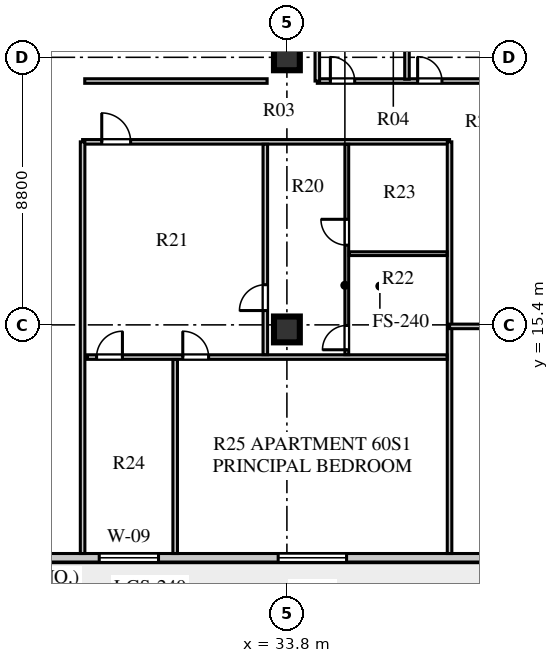
"""IFC4 building model, lengths in metres.
Left out: names, types, materials, properties, quantities, classifications, styles, units other than length and angle.
Written with IfcOpenShell. Run it as: python <this file> out.ifc"""

import sys

from ifc_helpers import new_model, si_unit, direction, frame, frame_2d, origin, origin_2d, place, context, subcontext, project, spatial, rectangle, extrude, element, fill, save


model = new_model("IFC4")
c1 = context("Model", 3, precision=1e-05, world=origin(), true_north=direction((0.0, 1.0)))
c2 = subcontext(c1, "Body", "Model", "MODEL_VIEW")
j1 = project(units=[si_unit("LENGTHUNIT", "METRE"), si_unit("PLANEANGLEUNIT", "RADIAN")], contexts=[c1])
p1 = place(None, origin())
s1 = spatial("IfcSite", under=j1, at=p1, CompositionType="ELEMENT")
p2 = place(p1, origin())
s2 = spatial("IfcBuilding", under=s1, at=p2, CompositionType="ELEMENT")
p3 = place(p2, frame((0.0, 0.0, 245.3)))
s3 = spatial("IfcBuildingStorey", under=s2, at=p3, CompositionType="ELEMENT", Elevation=245.3)
for number, where, z_axis, x_axis in (
    (1, (33.8, 15.25, 0.0), (0.0, 0.0, 1.0), (1.0, 0.0, 0.0)),
    (2, (33.8, 24.2, 0.0), (0.0, 0.0, 1.0), (1.0, 0.0, 0.0)),
):
    element("IfcColumn", number, at=place(p3, frame(where, z_axis=z_axis, x_axis=x_axis)), inside=s3, PredefinedType="COLUMN", context=c2, shape_type="SweptSolid", body=[
        extrude(rectangle(XDim=0.85, YDim=0.85, at=origin_2d()), origin(), (0.0, 0.0, 1.0), 3.66),
    ])
p4 = place(p3, frame((13.05, 7.74, 0.0), z_axis=(0.0, 0.0, 1.0), x_axis=(1.0, 0.0, 0.0)))
e3 = element("IfcWall", 3, at=p4, inside=s3, PredefinedType="STANDARD", context=c2, shape_type="SweptSolid", body=[
    extrude(rectangle(XDim=32.5, YDim=0.28, at=frame_2d((16.25, 0.0))), origin(), (0.0, 0.0, 1.0), 3.66),
])
p5 = place(p4, frame((0.95, 0.0, 0.0)))
e4 = element("IfcOpeningElement", 4, at=p5, cuts=e3, PredefinedType="OPENING", context=c2, shape_type="SweptSolid", body=[
    extrude(rectangle(XDim=1.0, YDim=2.05, at=frame_2d((0.5, 1.025))), frame((0.0, 0.15, 0.0), z_axis=(0.0, -1.0, 0.0), x_axis=(1.0, 0.0, 0.0)), (0.0, 0.0, 1.0), 0.3),
])
p6 = place(p4, frame((6.21, 0.0, 0.8)))
e5 = element("IfcOpeningElement", 5, at=p6, cuts=e3, PredefinedType="OPENING", context=c2, shape_type="SweptSolid", body=[
    extrude(rectangle(XDim=1.65, YDim=1.95, at=frame_2d((0.825, 0.975))), frame((0.0, 0.15, 0.0), z_axis=(0.0, -1.0, 0.0), x_axis=(1.0, 0.0, 0.0)), (0.0, 0.0, 1.0), 0.3),
])
p7 = place(p4, frame((14.577, 0.0, 0.8)))
e6 = element("IfcOpeningElement", 6, at=p7, cuts=e3, PredefinedType="OPENING", context=c2, shape_type="SweptSolid", body=[
    extrude(rectangle(XDim=1.95, YDim=2.0, at=frame_2d((0.975, 1.0))), frame((0.0, 0.15, 0.0), z_axis=(0.0, -1.0, 0.0), x_axis=(1.0, 0.0, 0.0)), (0.0, 0.0, 1.0), 0.3),
])
p8 = place(p4, frame((20.463, 0.0, 0.8)))
e7 = element("IfcOpeningElement", 7, at=p8, cuts=e3, PredefinedType="OPENING", context=c2, shape_type="SweptSolid", body=[
    extrude(rectangle(XDim=2.25, YDim=2.0, at=frame_2d((1.125, 1.0))), frame((0.0, 0.15, 0.0), z_axis=(0.0, -1.0, 0.0), x_axis=(1.0, 0.0, 0.0)), (0.0, 0.0, 1.0), 0.3),
])
p9 = place(p4, frame((28.345, 0.0, 0.8)))
e8 = element("IfcOpeningElement", 8, at=p9, cuts=e3, PredefinedType="OPENING", context=c2, shape_type="SweptSolid", body=[
    extrude(rectangle(XDim=1.8, YDim=2.0, at=frame_2d((0.9, 1.0))), frame((0.0, 0.15, 0.0), z_axis=(0.0, -1.0, 0.0), x_axis=(1.0, 0.0, 0.0)), (0.0, 0.0, 1.0), 0.3),
])
p10 = place(p3, frame((27.08, 21.42, 0.0), z_axis=(0.0, 0.0, 1.0), x_axis=(1.0, 0.0, 0.0)))
e9 = element("IfcWall", 9, at=p10, inside=s3, PredefinedType="PARTITIONING", context=c2, shape_type="SweptSolid", body=[
    extrude(rectangle(XDim=12.07, YDim=0.15, at=frame_2d((6.035, 0.0))), origin(), (0.0, 0.0, 1.0), 3.31),
])
p11 = place(p10, frame((0.63, 0.0, 0.0)))
e10 = element("IfcOpeningElement", 10, at=p11, cuts=e9, PredefinedType="OPENING", context=c2, shape_type="SweptSolid", body=[
    extrude(rectangle(XDim=0.95, YDim=2.1, at=frame_2d((0.475, 1.05))), frame((0.0, 0.085, 0.0), z_axis=(0.0, -1.0, 0.0), x_axis=(1.0, 0.0, 0.0)), (0.0, 0.0, 1.0), 0.17),
])
p12 = place(p3, frame((27.08, 7.88, 0.0), z_axis=(0.0, 0.0, 1.0), x_axis=(0.0, 1.0, 0.0)))
e11 = element("IfcWall", 11, at=p12, inside=s3, PredefinedType="PARTITIONING", context=c2, shape_type="SweptSolid", body=[
    extrude(rectangle(XDim=13.54, YDim=0.15, at=frame_2d((6.77, 0.0))), origin(), (0.0, 0.0, 1.0), 3.66),
])
p13 = place(p3, frame((27.15, 23.42, 0.0), z_axis=(0.0, 0.0, 1.0), x_axis=(1.0, 0.0, 0.0)))
e12 = element("IfcWall", 12, at=p13, inside=s3, PredefinedType="PARTITIONING", context=c2, shape_type="SweptSolid", body=[
    extrude(rectangle(XDim=6.0, YDim=0.15, at=frame_2d((3.0, 0.0))), origin(), (0.0, 0.0, 1.0), 3.66),
])
p14 = place(p3, frame((39.15, 7.88, 0.0), z_axis=(0.0, 0.0, 1.0), x_axis=(0.0, 1.0, 0.0)))
e13 = element("IfcWall", 13, at=p14, inside=s3, PredefinedType="PARTITIONING", context=c2, shape_type="SweptSolid", body=[
    extrude(rectangle(XDim=13.54, YDim=0.15, at=frame_2d((6.77, 0.0))), origin(), (0.0, 0.0, 1.0), 3.66),
])
p15 = place(p3, frame((27.24, 14.341, 0.0), z_axis=(0.0, 0.0, 1.0), x_axis=(1.0, 0.0, 0.0)))
e14 = element("IfcWall", 14, at=p15, inside=s3, PredefinedType="PARTITIONING", context=c2, shape_type="SweptSolid", body=[
    extrude(rectangle(XDim=11.83, YDim=0.15, at=frame_2d((5.915, 0.0))), origin(), (0.0, 0.0, 1.0), 3.66),
])
p16 = place(p15, frame((0.3, 0.0, 0.0)))
e15 = element("IfcOpeningElement", 15, at=p16, cuts=e14, PredefinedType="OPENING", context=c2, shape_type="SweptSolid", body=[
    extrude(rectangle(XDim=0.85, YDim=2.08, at=frame_2d((0.425, 1.04))), frame((0.0, 0.085, 0.0), z_axis=(0.0, -1.0, 0.0), x_axis=(1.0, 0.0, 0.0)), (0.0, 0.0, 1.0), 0.17),
])
p17 = place(p15, frame((3.135, 0.0, 0.0)))
e16 = element("IfcOpeningElement", 16, at=p17, cuts=e14, PredefinedType="OPENING", context=c2, shape_type="SweptSolid", body=[
    extrude(rectangle(XDim=0.85, YDim=2.08, at=frame_2d((0.425, 1.04))), frame((0.0, 0.085, 0.0), z_axis=(0.0, -1.0, 0.0), x_axis=(1.0, 0.0, 0.0)), (0.0, 0.0, 1.0), 0.17),
])
p18 = place(p3, frame((35.77, 14.421, 0.0), z_axis=(0.0, 0.0, 1.0), x_axis=(0.0, 1.0, 0.0)))
e17 = element("IfcWall", 17, at=p18, inside=s3, PredefinedType="PLUMBINGWALL", context=c2, shape_type="SweptSolid", body=[
    extrude(rectangle(XDim=6.919, YDim=0.125, at=frame_2d((3.459, 0.0))), origin(), (0.0, 0.0, 1.0), 3.66),
])
p19 = place(p18, frame((0.16, 0.0, 0.0)))
e18 = element("IfcOpeningElement", 18, at=p19, cuts=e17, PredefinedType="OPENING", context=c2, shape_type="SweptSolid", body=[
    extrude(rectangle(XDim=0.8, YDim=2.05, at=frame_2d((0.4, 1.025))), frame((0.0, 0.073, 0.0), z_axis=(0.0, -1.0, 0.0), x_axis=(1.0, 0.0, 0.0)), (0.0, 0.0, 1.0), 0.145),
])
p20 = place(p18, frame((3.601, 0.0, 0.0)))
e19 = element("IfcOpeningElement", 19, at=p20, cuts=e17, PredefinedType="OPENING", context=c2, shape_type="SweptSolid", body=[
    extrude(rectangle(XDim=0.85, YDim=2.08, at=frame_2d((0.425, 1.04))), frame((0.0, 0.073, 0.0), z_axis=(0.0, -1.0, 0.0), x_axis=(1.0, 0.0, 0.0)), (0.0, 0.0, 1.0), 0.145),
])
p21 = place(p3, frame((35.85, 17.742, 0.0), z_axis=(0.0, 0.0, 1.0), x_axis=(1.0, 0.0, 0.0)))
e20 = element("IfcWall", 20, at=p21, inside=s3, PredefinedType="PLUMBINGWALL", context=c2, shape_type="SweptSolid", body=[
    extrude(rectangle(XDim=3.22, YDim=0.125, at=frame_2d((1.61, 0.0))), origin(), (0.0, 0.0, 1.0), 3.66),
])
p22 = place(p3, frame((33.09, 14.421, 0.0), z_axis=(0.0, 0.0, 1.0), x_axis=(0.0, 1.0, 0.0)))
e21 = element("IfcWall", 21, at=p22, inside=s3, PredefinedType="PARTITIONING", context=c2, shape_type="SweptSolid", body=[
    extrude(rectangle(XDim=6.919, YDim=0.15, at=frame_2d((3.459, 0.0))), origin(), (0.0, 0.0, 1.0), 3.66),
])
p23 = place(p22, frame((1.45, 0.0, 0.0)))
e22 = element("IfcOpeningElement", 22, at=p23, cuts=e21, PredefinedType="OPENING", context=c2, shape_type="SweptSolid", body=[
    extrude(rectangle(XDim=0.85, YDim=2.08, at=frame_2d((0.425, 1.04))), frame((0.0, 0.085, 0.0), z_axis=(0.0, -1.0, 0.0), x_axis=(1.0, 0.0, 0.0)), (0.0, 0.0, 1.0), 0.17),
])
p24 = place(p3, frame((30.125, 7.88, 0.0), z_axis=(0.0, 0.0, 1.0), x_axis=(0.0, 1.0, 0.0)))
e23 = element("IfcWall", 23, at=p24, inside=s3, PredefinedType="PARTITIONING", context=c2, shape_type="SweptSolid", body=[
    extrude(rectangle(XDim=6.381, YDim=0.15, at=frame_2d((3.19, 0.0))), origin(), (0.0, 0.0, 1.0), 3.66),
])
p25 = place(p3, frame((39.15, 15.35, 0.0), z_axis=(0.0, 0.0, 1.0), x_axis=(1.0, 0.0, 0.0)))
e24 = element("IfcWall", 24, at=p25, inside=s3, PredefinedType="PARTITIONING", context=c2, shape_type="SweptSolid", body=[
    extrude(rectangle(XDim=11.37, YDim=0.15, at=frame_2d((5.685, 0.0))), origin(), (0.0, 0.0, 1.0), 3.06),
])
p26 = place(p3, frame((34.8, 23.42, 0.0), z_axis=(0.0, 0.0, 1.0), x_axis=(1.0, 0.0, 0.0)))
e25 = element("IfcWall", 25, at=p26, inside=s3, PredefinedType="PARTITIONING", context=c2, shape_type="SweptSolid", body=[
    extrude(rectangle(XDim=5.9, YDim=0.15, at=frame_2d((2.95, 0.0))), origin(), (0.0, 0.0, 1.0), 3.66),
])
p27 = place(p26, frame((0.43, 0.0, 0.0)))
e26 = element("IfcOpeningElement", 26, at=p27, cuts=e25, PredefinedType="OPENING", context=c2, shape_type="SweptSolid", body=[
    extrude(rectangle(XDim=0.8, YDim=2.05, at=frame_2d((0.4, 1.025))), frame((0.0, 0.085, 0.0), z_axis=(0.0, -1.0, 0.0), x_axis=(1.0, 0.0, 0.0)), (0.0, 0.0, 1.0), 0.17),
])
p28 = place(p26, frame((3.3, 0.0, 0.0)))
e27 = element("IfcOpeningElement", 27, at=p28, cuts=e25, PredefinedType="OPENING", context=c2, shape_type="SweptSolid", body=[
    extrude(rectangle(XDim=0.8, YDim=2.05, at=frame_2d((0.4, 1.025))), frame((0.0, 0.085, 0.0), z_axis=(0.0, -1.0, 0.0), x_axis=(1.0, 0.0, 0.0)), (0.0, 0.0, 1.0), 0.17),
])
p29 = place(p3, frame((34.8, 23.42, 0.0), z_axis=(0.0, 0.0, 1.0), x_axis=(0.0, 1.0, 0.0)))
e28 = element("IfcWall", 28, at=p29, inside=s3, PredefinedType="PARTITIONING", context=c2, shape_type="SweptSolid", body=[
    extrude(rectangle(XDim=3.78, YDim=0.15, at=frame_2d((1.89, 0.0))), origin(), (0.0, 0.0, 1.0), 3.66),
])
p30 = place(p3, frame((37.75, 23.48, 0.0), z_axis=(0.0, 0.0, 1.0), x_axis=(0.0, 1.0, 0.0)))
e29 = element("IfcWall", 29, at=p30, inside=s3, PredefinedType="PARTITIONING", context=c2, shape_type="SweptSolid", body=[
    extrude(rectangle(XDim=3.66, YDim=0.15, at=frame_2d((1.83, 0.0))), origin(), (0.0, 0.0, 1.0), 3.66),
])
p31 = place(p7, origin())
e30 = element("IfcWindow", 30, at=p31, inside=s3, PartitioningType="SINGLE_PANEL", PredefinedType="WINDOW", context=c2, shape_type="SweptSolid", body=[
    extrude(rectangle(XDim=1.95, YDim=2.0, at=frame_2d((0.975, 1.0))), frame((0.0, 0.03, 0.0), z_axis=(0.0, -1.0, 0.0), x_axis=(1.0, 0.0, 0.0)), (0.0, 0.0, 1.0), 0.06),
])
fill(e6, e30)
p32 = place(p8, origin())
e31 = element("IfcWindow", 31, at=p32, inside=s3, PartitioningType="SINGLE_PANEL", PredefinedType="WINDOW", context=c2, shape_type="SweptSolid", body=[
    extrude(rectangle(XDim=2.25, YDim=2.0, at=frame_2d((1.125, 1.0))), frame((0.0, 0.03, 0.0), z_axis=(0.0, -1.0, 0.0), x_axis=(1.0, 0.0, 0.0)), (0.0, 0.0, 1.0), 0.06),
])
fill(e7, e31)
p33 = place(p23, origin())
e32 = element("IfcDoor", 32, at=p33, inside=s3, OperationType="SINGLE_SWING_LEFT", PredefinedType="DOOR", context=c2, shape_type="SweptSolid", body=[
    extrude(rectangle(XDim=0.85, YDim=2.08, at=frame_2d((0.425, 1.04))), frame((0.0, 0.025, 0.0), z_axis=(0.0, -1.0, 0.0), x_axis=(1.0, 0.0, 0.0)), (0.0, 0.0, 1.0), 0.05),
])
fill(e22, e32)
p34 = place(p19, origin())
e33 = element("IfcDoor", 33, at=p34, inside=s3, OperationType="SINGLE_SWING_LEFT", PredefinedType="DOOR", context=c2, shape_type="SweptSolid", body=[
    extrude(rectangle(XDim=0.8, YDim=2.05, at=frame_2d((0.4, 1.025))), frame((0.0, 0.025, 0.0), z_axis=(0.0, -1.0, 0.0), x_axis=(1.0, 0.0, 0.0)), (0.0, 0.0, 1.0), 0.05),
])
fill(e18, e33)
p35 = place(p20, origin())
e34 = element("IfcDoor", 34, at=p35, inside=s3, OperationType="SINGLE_SWING_RIGHT", PredefinedType="DOOR", context=c2, shape_type="SweptSolid", body=[
    extrude(rectangle(XDim=0.85, YDim=2.08, at=frame_2d((0.425, 1.04))), frame((0.0, 0.025, 0.0), z_axis=(0.0, -1.0, 0.0), x_axis=(1.0, 0.0, 0.0)), (0.0, 0.0, 1.0), 0.05),
])
fill(e19, e34)
p36 = place(p16, frame((0.85, 0.0, 0.0), z_axis=(0.0, 0.0, 1.0), x_axis=(-1.0, 0.0, 0.0)))
e35 = element("IfcDoor", 35, at=p36, inside=s3, OperationType="SINGLE_SWING_LEFT", PredefinedType="DOOR", context=c2, shape_type="SweptSolid", body=[
    extrude(rectangle(XDim=0.85, YDim=2.08, at=frame_2d((0.425, 1.04))), frame((0.0, 0.025, 0.0), z_axis=(0.0, -1.0, 0.0), x_axis=(1.0, 0.0, 0.0)), (0.0, 0.0, 1.0), 0.05),
])
fill(e15, e35)
p37 = place(p17, frame((0.85, 0.0, 0.0), z_axis=(0.0, 0.0, 1.0), x_axis=(-1.0, 0.0, 0.0)))
e36 = element("IfcDoor", 36, at=p37, inside=s3, OperationType="SINGLE_SWING_RIGHT", PredefinedType="DOOR", context=c2, shape_type="SweptSolid", body=[
    extrude(rectangle(XDim=0.85, YDim=2.08, at=frame_2d((0.425, 1.04))), frame((0.0, 0.025, 0.0), z_axis=(0.0, -1.0, 0.0), x_axis=(1.0, 0.0, 0.0)), (0.0, 0.0, 1.0), 0.05),
])
fill(e16, e36)
p38 = place(p11, frame((0.95, 0.0, 0.0), z_axis=(0.0, 0.0, 1.0), x_axis=(-1.0, 0.0, 0.0)))
e37 = element("IfcDoor", 37, at=p38, inside=s3, OperationType="SINGLE_SWING_RIGHT", PredefinedType="DOOR", context=c2, shape_type="SweptSolid", body=[
    extrude(rectangle(XDim=0.95, YDim=2.1, at=frame_2d((0.475, 1.05))), frame((0.0, 0.025, 0.0), z_axis=(0.0, -1.0, 0.0), x_axis=(1.0, 0.0, 0.0)), (0.0, 0.0, 1.0), 0.05),
])
fill(e10, e37)
p39 = place(p27, origin())
e38 = element("IfcDoor", 38, at=p39, inside=s3, OperationType="SINGLE_SWING_LEFT", PredefinedType="DOOR", context=c2, shape_type="SweptSolid", body=[
    extrude(rectangle(XDim=0.8, YDim=2.05, at=frame_2d((0.4, 1.025))), frame((0.0, 0.025, 0.0), z_axis=(0.0, -1.0, 0.0), x_axis=(1.0, 0.0, 0.0)), (0.0, 0.0, 1.0), 0.05),
])
fill(e26, e38)
p40 = place(p28, origin())
e39 = element("IfcDoor", 39, at=p40, inside=s3, OperationType="SINGLE_SWING_LEFT", PredefinedType="DOOR", context=c2, shape_type="SweptSolid", body=[
    extrude(rectangle(XDim=0.8, YDim=2.05, at=frame_2d((0.4, 1.025))), frame((0.0, 0.025, 0.0), z_axis=(0.0, -1.0, 0.0), x_axis=(1.0, 0.0, 0.0)), (0.0, 0.0, 1.0), 0.05),
])
fill(e27, e39)
save(model, sys.argv[1])
